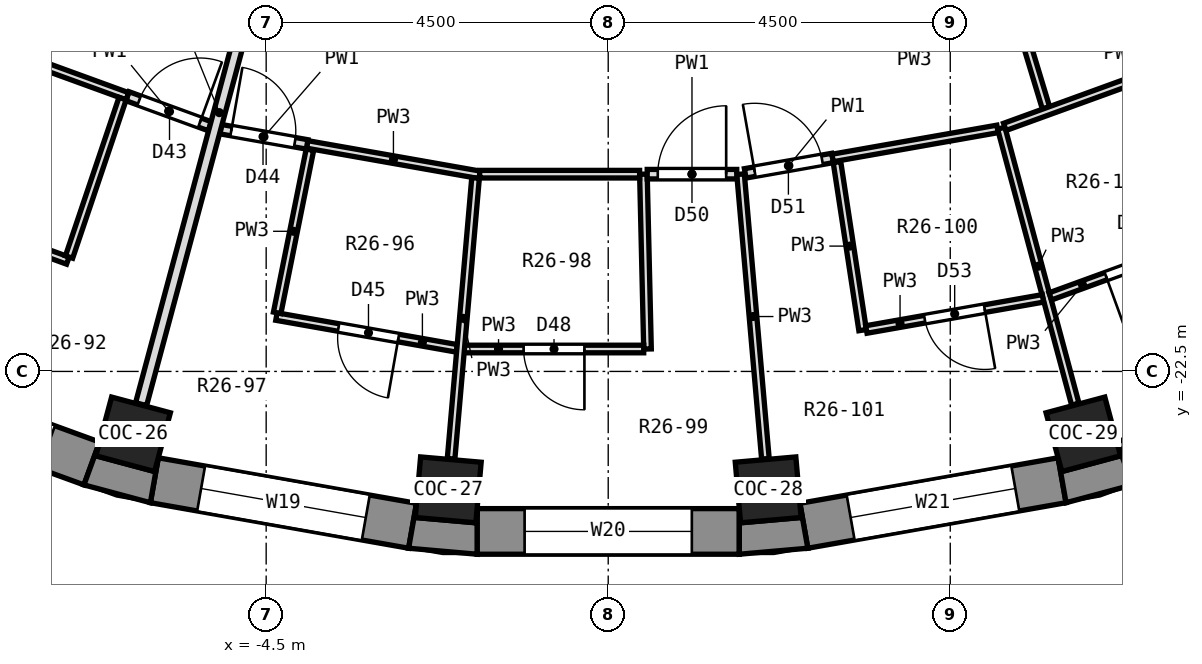
"""IFC4 building model, lengths in metres.
Left out: names, types, materials, properties, quantities, classifications, styles, units other than length and angle.
Written with IfcOpenShell. Run it as: python <this file> out.ifc"""

import sys

from ifc_helpers import new_model, si_unit, direction, frame, frame_2d, origin, origin_2d, place, context, subcontext, project, spatial, polyline, rectangle, outline, extrude, element, fill, save


model = new_model("IFC4")
c1 = context("Model", 3, precision=1e-05, world=origin(), true_north=direction((0.0, 1.0)))
c2 = subcontext(c1, "Body", "Model", "MODEL_VIEW")
j1 = project(units=[si_unit("LENGTHUNIT", "METRE"), si_unit("PLANEANGLEUNIT", "RADIAN")], contexts=[c1])
p1 = place(None, origin())
s1 = spatial("IfcSite", under=j1, at=p1, CompositionType="ELEMENT")
p2 = place(p1, origin())
s2 = spatial("IfcBuilding", under=s1, at=p2, CompositionType="ELEMENT")
p3 = place(p2, frame((0.0, 0.0, 170.7)))
s3 = spatial("IfcBuildingStorey", under=s2, at=p3, CompositionType="ELEMENT", Elevation=170.7)
for number, where, z_axis, x_axis in (
    (1, (-6.25, -23.327, 0.0), (0.0, 0.0, 1.0), (-0.259, -0.966, 0.0)),
    (2, (-2.105, -24.058, 0.0), (0.0, 0.0, 1.0), (-0.087, -0.996, 0.0)),
    (3, (2.105, -24.058, 0.0), (0.0, 0.0, 1.0), (0.087, -0.996, 0.0)),
    (4, (6.25, -23.327, 0.0), (0.0, 0.0, 1.0), (0.259, -0.966, 0.0)),
):
    element("IfcColumn", number, at=place(p3, frame(where, z_axis=z_axis, x_axis=x_axis)), inside=s3, PredefinedType="COLUMN", context=c2, shape_type="SweptSolid", body=[
        extrude(rectangle(XDim=0.8, YDim=0.8, at=origin_2d()), origin(), (0.0, 0.0, 1.0), 3.3),
    ])
p4 = place(p3, frame((-10.036, -22.531, 0.0), z_axis=(0.0, 0.0, 1.0), x_axis=(0.93968799822, -0.342032843455, 0.0)))
e5 = element("IfcWall", 5, at=p4, inside=s3, PredefinedType="SOLIDWALL", context=c2, shape_type="SweptSolid", body=[
    extrude(rectangle(XDim=3.45, YDim=0.6, at=frame_2d((1.725, 0.0))), origin(), (0.0, 0.0, 1.0), 2.85),
])
p5 = place(p4, frame((0.625, 0.0, 0.9)))
e6 = element("IfcOpeningElement", 6, at=p5, cuts=e5, PredefinedType="OPENING", context=c2, shape_type="SweptSolid", body=[
    extrude(rectangle(XDim=2.2, YDim=1.8, at=frame_2d((1.1, 0.9))), frame((0.0, 0.312, 0.0), z_axis=(0.0, -1.0, 0.0), x_axis=(1.0, 0.0, 0.0)), (0.0, 0.0, 1.0), 0.624),
])
p6 = place(p3, frame((-5.971, -23.932, 0.0), z_axis=(0.0, 0.0, 1.0), x_axis=(0.984814892183, -0.173607684551, 0.0)))
e7 = element("IfcWall", 7, at=p6, inside=s3, PredefinedType="SOLIDWALL", context=c2, shape_type="SweptSolid", body=[
    extrude(rectangle(XDim=3.45, YDim=0.6, at=frame_2d((1.725, 0.0))), origin(), (0.0, 0.0, 1.0), 2.85),
])
p7 = place(p6, frame((0.625, 0.0, 0.9)))
e8 = element("IfcOpeningElement", 8, at=p7, cuts=e7, PredefinedType="OPENING", context=c2, shape_type="SweptSolid", body=[
    extrude(rectangle(XDim=2.2, YDim=1.8, at=frame_2d((1.1, 0.9))), frame((0.0, 0.312, 0.0), z_axis=(0.0, -1.0, 0.0), x_axis=(1.0, 0.0, 0.0)), (0.0, 0.0, 1.0), 0.624),
])
p8 = place(p3, frame((-1.725, -24.605, 0.0), z_axis=(0.0, 0.0, 1.0), x_axis=(1.0, 0.0, 0.0)))
e9 = element("IfcWall", 9, at=p8, inside=s3, PredefinedType="SOLIDWALL", context=c2, shape_type="SweptSolid", body=[
    extrude(rectangle(XDim=3.45, YDim=0.6, at=frame_2d((1.725, 0.0))), origin(), (0.0, 0.0, 1.0), 2.85),
])
p9 = place(p8, frame((0.625, 0.0, 0.9)))
e10 = element("IfcOpeningElement", 10, at=p9, cuts=e9, PredefinedType="OPENING", context=c2, shape_type="SweptSolid", body=[
    extrude(rectangle(XDim=2.2, YDim=1.8, at=frame_2d((1.1, 0.9))), frame((0.0, 0.312, 0.0), z_axis=(0.0, -1.0, 0.0), x_axis=(1.0, 0.0, 0.0)), (0.0, 0.0, 1.0), 0.624),
])
p10 = place(p3, frame((2.574, -24.531, 0.0), z_axis=(0.0, 0.0, 1.0), x_axis=(0.984814892183, 0.173607684551, 0.0)))
e11 = element("IfcWall", 11, at=p10, inside=s3, PredefinedType="SOLIDWALL", context=c2, shape_type="SweptSolid", body=[
    extrude(rectangle(XDim=3.45, YDim=0.6, at=frame_2d((1.725, 0.0))), origin(), (0.0, 0.0, 1.0), 2.85),
])
p11 = place(p10, frame((0.625, 0.0, 0.9)))
e12 = element("IfcOpeningElement", 12, at=p11, cuts=e11, PredefinedType="OPENING", context=c2, shape_type="SweptSolid", body=[
    extrude(rectangle(XDim=2.2, YDim=1.8, at=frame_2d((1.1, 0.9))), frame((0.0, 0.312, 0.0), z_axis=(0.0, -1.0, 0.0), x_axis=(1.0, 0.0, 0.0)), (0.0, 0.0, 1.0), 0.624),
])
p12 = place(p3, frame((6.794, -23.711, 0.0), z_axis=(0.0, 0.0, 1.0), x_axis=(0.93968799822, 0.342032843455, 0.0)))
e13 = element("IfcWall", 13, at=p12, inside=s3, PredefinedType="SOLIDWALL", context=c2, shape_type="SweptSolid", body=[
    extrude(rectangle(XDim=3.45, YDim=0.6, at=frame_2d((1.725, 0.0))), origin(), (0.0, 0.0, 1.0), 2.85),
])
p13 = place(p12, frame((0.625, 0.0, 0.9)))
e14 = element("IfcOpeningElement", 14, at=p13, cuts=e13, PredefinedType="OPENING", context=c2, shape_type="SweptSolid", body=[
    extrude(rectangle(XDim=2.2, YDim=1.8, at=frame_2d((1.1, 0.9))), frame((0.0, 0.312, 0.0), z_axis=(0.0, -1.0, 0.0), x_axis=(1.0, 0.0, 0.0)), (0.0, 0.0, 1.0), 0.624),
])
p14 = place(p3, origin())
e15 = element("IfcWall", 15, at=p14, inside=s3, PredefinedType="SOLIDWALL", context=c2, shape_type="SweptSolid", body=[
    extrude(outline(polyline([(-6.023, -24.227), (-5.919, -23.636), (-5.968, -23.817), (-6.74, -23.61), (-6.692, -23.429), (-6.897, -23.993), (-6.023, -24.227)])), origin(), (0.0, 0.0, 1.0), 2.85),
])
p15 = place(p3, origin())
e16 = element("IfcWall", 16, at=p15, inside=s3, PredefinedType="SOLIDWALL", context=c2, shape_type="SweptSolid", body=[
    extrude(outline(polyline([(-2.626, -24.826), (-1.725, -24.905), (-1.725, -24.305), (-1.741, -24.491), (-2.538, -24.422), (-2.522, -24.235), (-2.626, -24.826)])), origin(), (0.0, 0.0, 1.0), 2.85),
])
p16 = place(p3, origin())
e17 = element("IfcWall", 17, at=p16, inside=s3, PredefinedType="SOLIDWALL", context=c2, shape_type="SweptSolid", body=[
    extrude(outline(polyline([(1.725, -24.905), (2.626, -24.826), (2.522, -24.235), (2.538, -24.422), (1.741, -24.491), (1.725, -24.305), (1.725, -24.905)])), origin(), (0.0, 0.0, 1.0), 2.85),
])
p17 = place(p3, origin())
e18 = element("IfcWall", 18, at=p17, inside=s3, PredefinedType="SOLIDWALL", context=c2, shape_type="SweptSolid", body=[
    extrude(outline(polyline([(6.023, -24.227), (6.897, -23.993), (6.692, -23.429), (6.74, -23.61), (5.968, -23.817), (5.919, -23.636), (6.023, -24.227)])), origin(), (0.0, 0.0, 1.0), 2.85),
])
p18 = place(p3, frame((0.463, -19.905, 0.0), z_axis=(0.0, 0.0, 1.0), x_axis=(0.023557837766, -0.99972247563, 0.0)))
e19 = element("IfcWall", 19, at=p18, inside=s3, PredefinedType="PARTITIONING", context=c2, shape_type="SweptSolid", body=[
    extrude(rectangle(XDim=2.301, YDim=0.1, at=frame_2d((1.15, 0.0))), origin(), (0.0, 0.0, 1.0), 2.85),
])
p19 = place(p3, frame((1.741, -19.905, 0.0), z_axis=(0.0, 0.0, 1.0), x_axis=(0.087033201937, -0.996205411429, 0.0)))
e20 = element("IfcWall", 20, at=p19, inside=s3, PredefinedType="PARTITIONING", context=c2, shape_type="SweptSolid", body=[
    extrude(rectangle(XDim=3.759, YDim=0.1, at=frame_2d((1.879, 0.0))), origin(), (0.0, 0.0, 1.0), 2.85),
])
p20 = place(p3, frame((3.01, -19.745, 0.0), z_axis=(0.0, 0.0, 1.0), x_axis=(0.150778111259, -0.988567631053, 0.0)))
e21 = element("IfcWall", 21, at=p20, inside=s3, PredefinedType="PARTITIONING", context=c2, shape_type="SweptSolid", body=[
    extrude(rectangle(XDim=2.238, YDim=0.1, at=frame_2d((1.119, 0.0))), origin(), (0.0, 0.0, 1.0), 2.85),
])
p21 = place(p3, frame((5.171, -19.3, 0.0), z_axis=(0.0, 0.0, 1.0), x_axis=(0.259065026248, -0.965859882268, 0.0)))
e22 = element("IfcWall", 22, at=p21, inside=s3, PredefinedType="PARTITIONING", context=c2, shape_type="SweptSolid", body=[
    extrude(rectangle(XDim=3.759, YDim=0.1, at=frame_2d((1.88, 0.0))), origin(), (0.0, 0.0, 1.0), 2.85),
])
p22 = place(p3, frame((4.539, -15.001, 0.0), z_axis=(0.0, 0.0, 1.0), x_axis=(0.289622909768, -0.95714083088, 0.0)))
e23 = element("IfcWall", 23, at=p22, inside=s3, PredefinedType="PARTITIONING", context=c2, shape_type="SweptSolid", body=[
    extrude(rectangle(XDim=4.212, YDim=0.1, at=frame_2d((2.106, 0.0))), origin(), (0.0, 0.0, 1.0), 2.85),
])
p23 = place(p22, frame((2.25, 0.0, 0.0)))
e24 = element("IfcOpeningElement", 24, at=p23, cuts=e23, PredefinedType="OPENING", context=c2, shape_type="SweptSolid", body=[
    extrude(rectangle(XDim=0.9, YDim=2.1, at=frame_2d((0.45, 1.05))), frame((0.0, 0.062, 0.0), z_axis=(0.0, -1.0, 0.0), x_axis=(1.0, 0.0, 0.0)), (0.0, 0.0, 1.0), 0.124),
])
p24 = place(p3, frame((-6.325, -18.879, 0.0), z_axis=(0.0, 0.0, 1.0), x_axis=(0.93942221686, -0.342762160206, 0.0)))
e25 = element("IfcWall", 25, at=p24, inside=s3, PredefinedType="PARTITIONING", context=c2, shape_type="SweptSolid", body=[
    extrude(rectangle(XDim=1.154, YDim=0.125, at=frame_2d((0.577, 0.0))), origin(), (0.0, 0.0, 1.0), 2.85),
])
p25 = place(p24, frame((0.165, 0.0, 0.0)))
e26 = element("IfcOpeningElement", 26, at=p25, cuts=e25, PredefinedType="OPENING", context=c2, shape_type="SweptSolid", body=[
    extrude(rectangle(XDim=0.85, YDim=2.1, at=frame_2d((0.425, 1.05))), frame((0.0, 0.074, 0.0), z_axis=(0.0, -1.0, 0.0), x_axis=(1.0, 0.0, 0.0)), (0.0, 0.0, 1.0), 0.149),
])
p26 = place(p3, frame((-9.373, -20.218, 0.0), z_axis=(0.0, 0.0, 1.0), x_axis=(0.939707598657, -0.34197898916, 0.0)))
e27 = element("IfcWall", 27, at=p26, inside=s3, PredefinedType="PARTITIONING", context=c2, shape_type="SweptSolid", body=[
    extrude(rectangle(XDim=2.409, YDim=0.1, at=frame_2d((1.205, 0.0))), origin(), (0.0, 0.0, 1.0), 2.85),
])
p27 = place(p26, frame((0.78, 0.0, 0.0)))
e28 = element("IfcOpeningElement", 28, at=p27, cuts=e27, PredefinedType="OPENING", context=c2, shape_type="SweptSolid", body=[
    extrude(rectangle(XDim=0.8, YDim=2.1, at=frame_2d((0.4, 1.05))), frame((0.0, 0.062, 0.0), z_axis=(0.0, -1.0, 0.0), x_axis=(1.0, 0.0, 0.0)), (0.0, 0.0, 1.0), 0.124),
])
p28 = place(p3, frame((-8.397, -18.126, 0.0), z_axis=(0.0, 0.0, 1.0), x_axis=(0.939676937302, -0.342063230271, 0.0)))
e29 = element("IfcWall", 29, at=p28, inside=s3, PredefinedType="PARTITIONING", context=c2, shape_type="SweptSolid", body=[
    extrude(rectangle(XDim=2.204, YDim=0.1, at=frame_2d((1.102, 0.0))), origin(), (0.0, 0.0, 1.0), 2.85),
])
p29 = place(p3, frame((-4.365, -21.778, 0.0), z_axis=(0.0, 0.0, 1.0), x_axis=(0.984820260231, -0.173577230762, 0.0)))
e30 = element("IfcWall", 30, at=p29, inside=s3, PredefinedType="PARTITIONING", context=c2, shape_type="SweptSolid", body=[
    extrude(rectangle(XDim=2.409, YDim=0.1, at=frame_2d((1.205, 0.0))), origin(), (0.0, 0.0, 1.0), 2.85),
])
p30 = place(p29, frame((0.83, 0.0, 0.0)))
e31 = element("IfcOpeningElement", 31, at=p30, cuts=e30, PredefinedType="OPENING", context=c2, shape_type="SweptSolid", body=[
    extrude(rectangle(XDim=0.8, YDim=2.1, at=frame_2d((0.4, 1.05))), frame((0.0, 0.062, 0.0), z_axis=(0.0, -1.0, 0.0), x_axis=(1.0, 0.0, 0.0)), (0.0, 0.0, 1.0), 0.124),
])
p31 = place(p3, frame((-3.961, -19.513, 0.0), z_axis=(0.0, 0.0, 1.0), x_axis=(0.984801677979, -0.173682627367, 0.0)))
e32 = element("IfcWall", 32, at=p31, inside=s3, PredefinedType="PARTITIONING", context=c2, shape_type="SweptSolid", body=[
    extrude(rectangle(XDim=2.305, YDim=0.1, at=frame_2d((1.153, 0.0))), origin(), (0.0, 0.0, 1.0), 2.85),
])
p32 = place(p3, frame((-5.097, -19.313, 0.0), z_axis=(0.0, 0.0, 1.0), x_axis=(0.984787819846, -0.173761186352, 0.0)))
e33 = element("IfcWall", 33, at=p32, inside=s3, PredefinedType="PARTITIONING", context=c2, shape_type="SweptSolid", body=[
    extrude(rectangle(XDim=1.154, YDim=0.125, at=frame_2d((0.577, 0.0))), origin(), (0.0, 0.0, 1.0), 2.85),
])
p33 = place(p32, frame((0.139, 0.0, 0.0)))
e34 = element("IfcOpeningElement", 34, at=p33, cuts=e33, PredefinedType="OPENING", context=c2, shape_type="SweptSolid", body=[
    extrude(rectangle(XDim=0.85, YDim=2.1, at=frame_2d((0.425, 1.05))), frame((0.0, 0.074, 0.0), z_axis=(0.0, -1.0, 0.0), x_axis=(1.0, 0.0, 0.0)), (0.0, 0.0, 1.0), 0.149),
])
p34 = place(p3, frame((-1.893, -22.205, 0.0), z_axis=(0.0, 0.0, 1.0), x_axis=(1.0, 0.0, 0.0)))
e35 = element("IfcWall", 35, at=p34, inside=s3, PredefinedType="PARTITIONING", context=c2, shape_type="SweptSolid", body=[
    extrude(rectangle(XDim=2.36, YDim=0.1, at=frame_2d((1.18, 0.0))), origin(), (0.0, 0.0, 1.0), 2.85),
])
p35 = place(p34, frame((0.78, 0.0, 0.0)))
e36 = element("IfcOpeningElement", 36, at=p35, cuts=e35, PredefinedType="OPENING", context=c2, shape_type="SweptSolid", body=[
    extrude(rectangle(XDim=0.8, YDim=2.1, at=frame_2d((0.4, 1.05))), frame((0.0, 0.062, 0.0), z_axis=(0.0, -1.0, 0.0), x_axis=(1.0, 0.0, 0.0)), (0.0, 0.0, 1.0), 0.124),
])
p36 = place(p3, frame((-1.691, -19.905, 0.0), z_axis=(0.0, 0.0, 1.0), x_axis=(1.0, 0.0, 0.0)))
e37 = element("IfcWall", 37, at=p36, inside=s3, PredefinedType="PARTITIONING", context=c2, shape_type="SweptSolid", body=[
    extrude(rectangle(XDim=2.104, YDim=0.1, at=frame_2d((1.052, 0.0))), origin(), (0.0, 0.0, 1.0), 2.85),
])
p37 = place(p3, frame((0.513, -19.905, 0.0), z_axis=(0.0, 0.0, 1.0), x_axis=(1.0, 0.0, 0.0)))
e38 = element("IfcWall", 38, at=p37, inside=s3, PredefinedType="PARTITIONING", context=c2, shape_type="SweptSolid", body=[
    extrude(rectangle(XDim=1.178, YDim=0.125, at=frame_2d((0.589, 0.0))), origin(), (0.0, 0.0, 1.0), 2.85),
])
p38 = place(p37, frame((0.139, 0.0, 0.0)))
e39 = element("IfcOpeningElement", 39, at=p38, cuts=e38, PredefinedType="OPENING", context=c2, shape_type="SweptSolid", body=[
    extrude(rectangle(XDim=0.9, YDim=2.1, at=frame_2d((0.45, 1.05))), frame((0.0, 0.074, 0.0), z_axis=(0.0, -1.0, 0.0), x_axis=(1.0, 0.0, 0.0)), (0.0, 0.0, 1.0), 0.149),
])
p39 = place(p3, frame((3.396, -21.948, 0.0), z_axis=(0.0, 0.0, 1.0), x_axis=(0.984809591131, 0.173637752855, 0.0)))
e40 = element("IfcWall", 40, at=p39, inside=s3, PredefinedType="PARTITIONING", context=c2, shape_type="SweptSolid", body=[
    extrude(rectangle(XDim=2.359, YDim=0.1, at=frame_2d((1.18, 0.0))), origin(), (0.0, 0.0, 1.0), 2.85),
])
p40 = place(p39, frame((0.78, 0.0, 0.0)))
e41 = element("IfcOpeningElement", 41, at=p40, cuts=e40, PredefinedType="OPENING", context=c2, shape_type="SweptSolid", body=[
    extrude(rectangle(XDim=0.8, YDim=2.1, at=frame_2d((0.4, 1.05))), frame((0.0, 0.062, 0.0), z_axis=(0.0, -1.0, 0.0), x_axis=(1.0, 0.0, 0.0)), (0.0, 0.0, 1.0), 0.124),
])
p41 = place(p3, frame((2.951, -19.692, 0.0), z_axis=(0.0, 0.0, 1.0), x_axis=(0.984828120468, 0.173532628446, 0.0)))
e42 = element("IfcWall", 42, at=p41, inside=s3, PredefinedType="PARTITIONING", context=c2, shape_type="SweptSolid", body=[
    extrude(rectangle(XDim=2.205, YDim=0.1, at=frame_2d((1.102, 0.0))), origin(), (0.0, 0.0, 1.0), 2.85),
])
p42 = place(p3, frame((1.802, -19.894, 0.0), z_axis=(0.0, 0.0, 1.0), x_axis=(0.984853048851, 0.173391095992, 0.0)))
e43 = element("IfcWall", 43, at=p42, inside=s3, PredefinedType="PARTITIONING", context=c2, shape_type="SweptSolid", body=[
    extrude(rectangle(XDim=1.166, YDim=0.125, at=frame_2d((0.583, 0.0))), origin(), (0.0, 0.0, 1.0), 2.85),
])
p43 = place(p42, frame((0.127, 0.0, 0.0)))
e44 = element("IfcOpeningElement", 44, at=p43, cuts=e43, PredefinedType="OPENING", context=c2, shape_type="SweptSolid", body=[
    extrude(rectangle(XDim=0.9, YDim=2.1, at=frame_2d((0.45, 1.05))), frame((0.0, 0.074, 0.0), z_axis=(0.0, -1.0, 0.0), x_axis=(1.0, 0.0, 0.0)), (0.0, 0.0, 1.0), 0.149),
])
p44 = place(p3, frame((5.816, -21.513, 0.0), z_axis=(0.0, 0.0, 1.0), x_axis=(0.939699727678, 0.342000616669, 0.0)))
e45 = element("IfcWall", 45, at=p44, inside=s3, PredefinedType="PARTITIONING", context=c2, shape_type="SweptSolid", body=[
    extrude(rectangle(XDim=2.359, YDim=0.1, at=frame_2d((1.18, 0.0))), origin(), (0.0, 0.0, 1.0), 2.85),
])
p45 = place(p44, frame((0.78, 0.0, 0.0)))
e46 = element("IfcOpeningElement", 46, at=p45, cuts=e45, PredefinedType="OPENING", context=c2, shape_type="SweptSolid", body=[
    extrude(rectangle(XDim=0.8, YDim=2.1, at=frame_2d((0.4, 1.05))), frame((0.0, 0.062, 0.0), z_axis=(0.0, -1.0, 0.0), x_axis=(1.0, 0.0, 0.0)), (0.0, 0.0, 1.0), 0.124),
])
p46 = place(p3, frame((5.218, -19.283, 0.0), z_axis=(0.0, 0.0, 1.0), x_axis=(0.939938953839, 0.341342588987, 0.0)))
e47 = element("IfcWall", 47, at=p46, inside=s3, PredefinedType="PARTITIONING", context=c2, shape_type="SweptSolid", body=[
    extrude(rectangle(XDim=2.105, YDim=0.1, at=frame_2d((1.052, 0.0))), origin(), (0.0, 0.0, 1.0), 2.85),
])
p47 = place(p3, frame((-7.093, -20.995, 0.0), z_axis=(0.0, 0.0, 1.0), x_axis=(0.320053851591, 0.947399351953, 0.0)))
e48 = element("IfcWall", 48, at=p47, inside=s3, PredefinedType="PARTITIONING", context=c2, shape_type="SweptSolid", body=[
    extrude(rectangle(XDim=2.2, YDim=0.1, at=frame_2d((1.1, 0.0))), origin(), (0.0, 0.0, 1.0), 2.85),
])
p48 = place(p3, frame((-6.146, -22.931, 0.0), z_axis=(0.0, 0.0, 1.0), x_axis=(0.259231390727, 0.965815244269, 0.0)))
e49 = element("IfcWall", 49, at=p48, inside=s3, PredefinedType="PARTITIONING", context=c2, shape_type="SweptSolid", body=[
    extrude(rectangle(XDim=7.941, YDim=0.15, at=frame_2d((3.971, 0.0))), origin(), (0.0, 0.0, 1.0), 2.85),
])
p49 = place(p3, frame((-4.355, -21.729, 0.0), z_axis=(0.0, 0.0, 1.0), x_axis=(0.196888353759, 0.980425915689, 0.0)))
e50 = element("IfcWall", 50, at=p49, inside=s3, PredefinedType="PARTITIONING", context=c2, shape_type="SweptSolid", body=[
    extrude(rectangle(XDim=2.188, YDim=0.1, at=frame_2d((1.094, 0.0))), origin(), (0.0, 0.0, 1.0), 2.85),
])
p50 = place(p3, frame((-2.067, -23.65, 0.0), z_axis=(0.0, 0.0, 1.0), x_axis=(0.086819919703, 0.996224021766, 0.0)))
e51 = element("IfcWall", 51, at=p50, inside=s3, PredefinedType="PARTITIONING", context=c2, shape_type="SweptSolid", body=[
    extrude(rectangle(XDim=3.709, YDim=0.1, at=frame_2d((1.854, 0.0))), origin(), (0.0, 0.0, 1.0), 2.85),
])
p51 = place(p7, origin())
e52 = element("IfcWindow", 52, at=p51, inside=s3, PartitioningType="SINGLE_PANEL", PredefinedType="WINDOW", context=c2, shape_type="SweptSolid", body=[
    extrude(rectangle(XDim=2.2, YDim=1.8, at=frame_2d((1.1, 0.9))), frame((0.0, 0.18, 0.0), z_axis=(0.0, -1.0, 0.0), x_axis=(1.0, 0.0, 0.0)), (0.0, 0.0, 1.0), 0.06),
])
fill(e8, e52)
p52 = place(p9, origin())
e53 = element("IfcWindow", 53, at=p52, inside=s3, PartitioningType="SINGLE_PANEL", PredefinedType="WINDOW", context=c2, shape_type="SweptSolid", body=[
    extrude(rectangle(XDim=2.2, YDim=1.8, at=frame_2d((1.1, 0.9))), frame((0.0, 0.18, 0.0), z_axis=(0.0, -1.0, 0.0), x_axis=(1.0, 0.0, 0.0)), (0.0, 0.0, 1.0), 0.06),
])
fill(e10, e53)
p53 = place(p11, origin())
e54 = element("IfcWindow", 54, at=p53, inside=s3, PartitioningType="SINGLE_PANEL", PredefinedType="WINDOW", context=c2, shape_type="SweptSolid", body=[
    extrude(rectangle(XDim=2.2, YDim=1.8, at=frame_2d((1.1, 0.9))), frame((0.0, 0.18, 0.0), z_axis=(0.0, -1.0, 0.0), x_axis=(1.0, 0.0, 0.0)), (0.0, 0.0, 1.0), 0.06),
])
fill(e12, e54)
p54 = place(p25, origin())
e55 = element("IfcDoor", 55, at=p54, inside=s3, OperationType="SINGLE_SWING_RIGHT", PredefinedType="DOOR", context=c2, shape_type="SweptSolid", body=[
    extrude(rectangle(XDim=0.85, YDim=2.1, at=frame_2d((0.425, 1.05))), frame((0.0, 0.025, 0.0), z_axis=(0.0, -1.0, 0.0), x_axis=(1.0, 0.0, 0.0)), (0.0, 0.0, 1.0), 0.05),
])
fill(e26, e55)
p55 = place(p33, origin())
e56 = element("IfcDoor", 56, at=p55, inside=s3, OperationType="SINGLE_SWING_LEFT", PredefinedType="DOOR", context=c2, shape_type="SweptSolid", body=[
    extrude(rectangle(XDim=0.85, YDim=2.1, at=frame_2d((0.425, 1.05))), frame((0.0, 0.025, 0.0), z_axis=(0.0, -1.0, 0.0), x_axis=(1.0, 0.0, 0.0)), (0.0, 0.0, 1.0), 0.05),
])
fill(e34, e56)
p56 = place(p30, frame((0.8, 0.0, 0.0), z_axis=(0.0, 0.0, 1.0), x_axis=(-1.0, 0.0, 0.0)))
e57 = element("IfcDoor", 57, at=p56, inside=s3, OperationType="SINGLE_SWING_LEFT", PredefinedType="DOOR", context=c2, shape_type="SweptSolid", body=[
    extrude(rectangle(XDim=0.8, YDim=2.1, at=frame_2d((0.4, 1.05))), frame((0.0, 0.025, 0.0), z_axis=(0.0, -1.0, 0.0), x_axis=(1.0, 0.0, 0.0)), (0.0, 0.0, 1.0), 0.05),
])
fill(e31, e57)
p57 = place(p35, frame((0.8, 0.0, 0.0), z_axis=(0.0, 0.0, 1.0), x_axis=(-1.0, 0.0, 0.0)))
e58 = element("IfcDoor", 58, at=p57, inside=s3, OperationType="SINGLE_SWING_LEFT", PredefinedType="DOOR", context=c2, shape_type="SweptSolid", body=[
    extrude(rectangle(XDim=0.8, YDim=2.1, at=frame_2d((0.4, 1.05))), frame((0.0, 0.025, 0.0), z_axis=(0.0, -1.0, 0.0), x_axis=(1.0, 0.0, 0.0)), (0.0, 0.0, 1.0), 0.05),
])
fill(e36, e58)
p58 = place(p38, origin())
e59 = element("IfcDoor", 59, at=p58, inside=s3, OperationType="SINGLE_SWING_RIGHT", PredefinedType="DOOR", context=c2, shape_type="SweptSolid", body=[
    extrude(rectangle(XDim=0.9, YDim=2.1, at=frame_2d((0.45, 1.05))), frame((0.0, 0.025, 0.0), z_axis=(0.0, -1.0, 0.0), x_axis=(1.0, 0.0, 0.0)), (0.0, 0.0, 1.0), 0.05),
])
fill(e39, e59)
p59 = place(p43, origin())
e60 = element("IfcDoor", 60, at=p59, inside=s3, OperationType="SINGLE_SWING_LEFT", PredefinedType="DOOR", context=c2, shape_type="SweptSolid", body=[
    extrude(rectangle(XDim=0.9, YDim=2.1, at=frame_2d((0.45, 1.05))), frame((0.0, 0.025, 0.0), z_axis=(0.0, -1.0, 0.0), x_axis=(1.0, 0.0, 0.0)), (0.0, 0.0, 1.0), 0.05),
])
fill(e44, e60)
p60 = place(p40, frame((0.8, 0.0, 0.0), z_axis=(0.0, 0.0, 1.0), x_axis=(-1.0, 0.0, 0.0)))
e61 = element("IfcDoor", 61, at=p60, inside=s3, OperationType="SINGLE_SWING_LEFT", PredefinedType="DOOR", context=c2, shape_type="SweptSolid", body=[
    extrude(rectangle(XDim=0.8, YDim=2.1, at=frame_2d((0.4, 1.05))), frame((0.0, 0.025, 0.0), z_axis=(0.0, -1.0, 0.0), x_axis=(1.0, 0.0, 0.0)), (0.0, 0.0, 1.0), 0.05),
])
fill(e41, e61)
p61 = place(p45, frame((0.8, 0.0, 0.0), z_axis=(0.0, 0.0, 1.0), x_axis=(-1.0, 0.0, 0.0)))
e62 = element("IfcDoor", 62, at=p61, inside=s3, OperationType="SINGLE_SWING_RIGHT", PredefinedType="DOOR", context=c2, shape_type="SweptSolid", body=[
    extrude(rectangle(XDim=0.8, YDim=2.1, at=frame_2d((0.4, 1.05))), frame((0.0, 0.025, 0.0), z_axis=(0.0, -1.0, 0.0), x_axis=(1.0, 0.0, 0.0)), (0.0, 0.0, 1.0), 0.05),
])
fill(e46, e62)
save(model, sys.argv[1])
